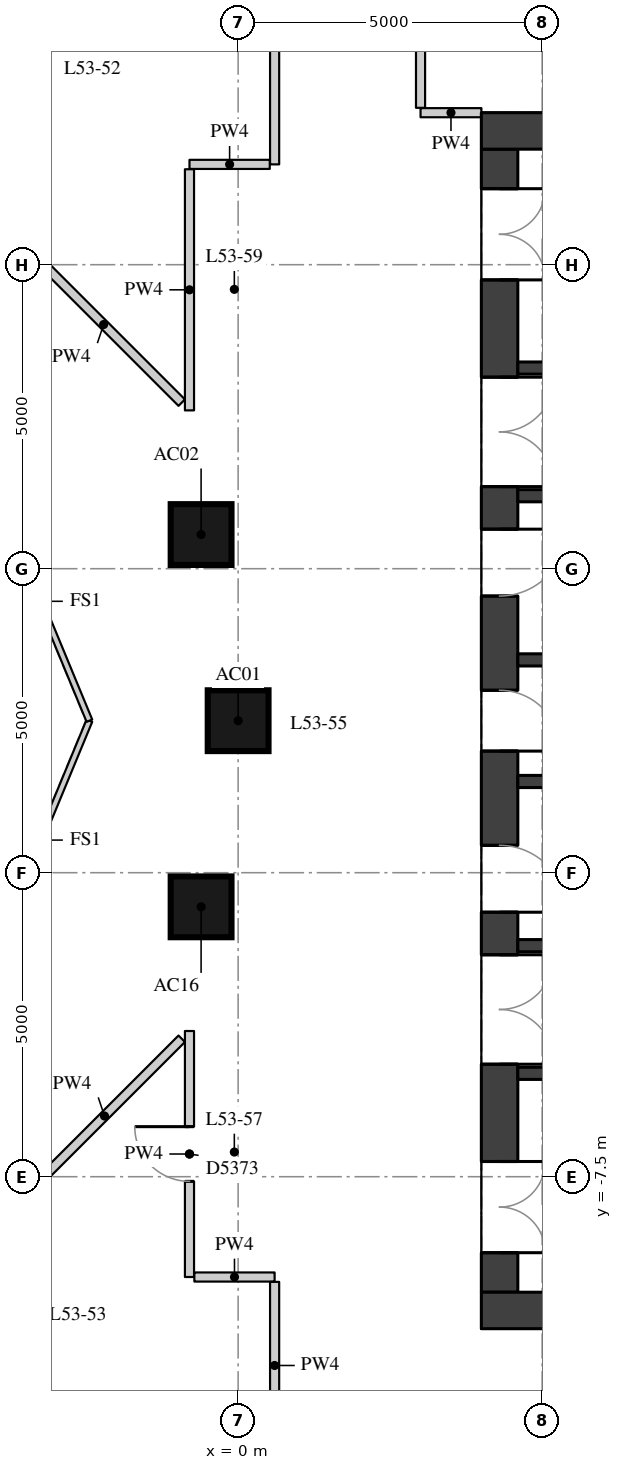
"""IFC4 building model, lengths in metres.
Left out: names, types, materials, properties, quantities, classifications, styles, units other than length and angle.
Written with IfcOpenShell. Run it as: python <this file> out.ifc"""

import sys

from ifc_helpers import new_model, si_unit, direction, frame, frame_2d, origin, origin_2d, place, context, subcontext, project, spatial, rectangle, extrude, element, fill, save


model = new_model("IFC4")
c1 = context("Model", 3, precision=1e-05, world=origin(), true_north=direction((0.0, 1.0)))
c2 = subcontext(c1, "Body", "Model", "MODEL_VIEW")
j1 = project(units=[si_unit("LENGTHUNIT", "METRE"), si_unit("PLANEANGLEUNIT", "RADIAN")], contexts=[c1])
p1 = place(None, origin())
s1 = spatial("IfcSite", under=j1, at=p1, CompositionType="ELEMENT")
p2 = place(p1, origin())
s2 = spatial("IfcBuilding", under=s1, at=p2, CompositionType="ELEMENT")
p3 = place(p2, frame((0.0, 0.0, 189.2)))
s3 = spatial("IfcBuildingStorey", under=s2, at=p3, CompositionType="ELEMENT", Elevation=189.2)
for number, where, z_axis, x_axis in (
    (1, (0.0, 0.0, 0.0), (0.0, 0.0, 1.0), (1.0, 0.0, 0.0)),
    (2, (-0.609, 3.062, 0.0), (0.0, 0.0, 1.0), (1.0, 0.0, 0.0)),
    (3, (-0.609, -3.062, 0.0), (0.0, 0.0, 1.0), (1.0, 0.0, 0.0)),
):
    element("IfcColumn", number, at=place(p3, frame(where, z_axis=z_axis, x_axis=x_axis)), inside=s3, PredefinedType="COLUMN", context=c2, shape_type="SweptSolid", body=[
        extrude(rectangle(XDim=1.0, YDim=1.0, at=origin_2d()), origin(), (0.0, 0.0, 1.0), 3.3),
    ])
p4 = place(p3, frame((4.3, -9.4, 0.0), z_axis=(0.0, 0.0, 1.0), x_axis=(0.0, 1.0, 0.0)))
e4 = element("IfcWall", 4, at=p4, inside=s3, PredefinedType="SHEAR", context=c2, shape_type="SweptSolid", body=[
    extrude(rectangle(XDim=18.8, YDim=0.6, at=frame_2d((9.4, 0.0))), origin(), (0.0, 0.0, 1.0), 3.02),
])
p5 = place(p4, frame((0.65, 0.0, 0.0)))
e5 = element("IfcOpeningElement", 5, at=p5, cuts=e4, PredefinedType="OPENING", context=c2, shape_type="SweptSolid", body=[
    extrude(rectangle(XDim=1.5, YDim=2.1, at=frame_2d((0.75, 1.05))), frame((0.0, 0.31, 0.0), z_axis=(0.0, -1.0, 0.0), x_axis=(1.0, 0.0, 0.0)), (0.0, 0.0, 1.0), 0.62),
])
p6 = place(p4, frame((3.75, 0.0, 0.0)))
e6 = element("IfcOpeningElement", 6, at=p6, cuts=e4, PredefinedType="OPENING", context=c2, shape_type="SweptSolid", body=[
    extrude(rectangle(XDim=1.8, YDim=2.1, at=frame_2d((0.9, 1.05))), frame((0.0, 0.31, 0.0), z_axis=(0.0, -1.0, 0.0), x_axis=(1.0, 0.0, 0.0)), (0.0, 0.0, 1.0), 0.62),
])
p7 = place(p4, frame((6.25, 0.0, 0.0)))
e7 = element("IfcOpeningElement", 7, at=p7, cuts=e4, PredefinedType="OPENING", context=c2, shape_type="SweptSolid", body=[
    extrude(rectangle(XDim=1.1, YDim=2.1, at=frame_2d((0.55, 1.05))), frame((0.0, 0.31, 0.0), z_axis=(0.0, -1.0, 0.0), x_axis=(1.0, 0.0, 0.0)), (0.0, 0.0, 1.0), 0.62),
])
p8 = place(p4, frame((8.9, 0.0, 0.0)))
e8 = element("IfcOpeningElement", 8, at=p8, cuts=e4, PredefinedType="OPENING", context=c2, shape_type="SweptSolid", body=[
    extrude(rectangle(XDim=1.0, YDim=2.1, at=frame_2d((0.5, 1.05))), frame((0.0, 0.31, 0.0), z_axis=(0.0, -1.0, 0.0), x_axis=(1.0, 0.0, 0.0)), (0.0, 0.0, 1.0), 0.62),
])
p9 = place(p4, frame((11.45, 0.0, 0.0)))
e9 = element("IfcOpeningElement", 9, at=p9, cuts=e4, PredefinedType="OPENING", context=c2, shape_type="SweptSolid", body=[
    extrude(rectangle(XDim=1.1, YDim=2.1, at=frame_2d((0.55, 1.05))), frame((0.0, 0.31, 0.0), z_axis=(0.0, -1.0, 0.0), x_axis=(1.0, 0.0, 0.0)), (0.0, 0.0, 1.0), 0.62),
])
p10 = place(p4, frame((13.25, 0.0, 0.0)))
e10 = element("IfcOpeningElement", 10, at=p10, cuts=e4, PredefinedType="OPENING", context=c2, shape_type="SweptSolid", body=[
    extrude(rectangle(XDim=1.8, YDim=2.1, at=frame_2d((0.9, 1.05))), frame((0.0, 0.31, 0.0), z_axis=(0.0, -1.0, 0.0), x_axis=(1.0, 0.0, 0.0)), (0.0, 0.0, 1.0), 0.62),
])
p11 = place(p4, frame((16.65, 0.0, 0.0)))
e11 = element("IfcOpeningElement", 11, at=p11, cuts=e4, PredefinedType="OPENING", context=c2, shape_type="SweptSolid", body=[
    extrude(rectangle(XDim=1.5, YDim=2.1, at=frame_2d((0.75, 1.05))), frame((0.0, 0.31, 0.0), z_axis=(0.0, -1.0, 0.0), x_axis=(1.0, 0.0, 0.0)), (0.0, 0.0, 1.0), 0.62),
])
for number, where, z_axis, x_axis in (
    (12, (4.0, 9.7, 0.0), (0.0, 0.0, 1.0), (1.0, 0.0, 0.0)),
    (13, (4.0, -9.7, 0.0), (0.0, 0.0, 1.0), (1.0, 0.0, 0.0)),
):
    element("IfcWall", number, at=place(p3, frame(where, z_axis=z_axis, x_axis=x_axis)), inside=s3, PredefinedType="SHEAR", context=c2, shape_type="SweptSolid", body=[
        extrude(rectangle(XDim=12.0, YDim=0.6, at=frame_2d((6.0, 0.0))), origin(), (0.0, 0.0, 1.0), 3.02),
    ])
p12 = place(p3, frame((4.6, 5.8, 0.0), z_axis=(0.0, 0.0, 1.0), x_axis=(1.0, 0.0, 0.0)))
e14 = element("IfcWall", 14, at=p12, inside=s3, PredefinedType="SHEAR", context=c2, shape_type="SweptSolid", body=[
    extrude(rectangle(XDim=10.8, YDim=0.2, at=frame_2d((5.4, 0.0))), origin(), (0.0, 0.0, 1.0), 3.02),
])
p13 = place(p12, frame((7.05, 0.0, 0.0)))
e15 = element("IfcOpeningElement", 15, at=p13, cuts=e14, PredefinedType="OPENING", context=c2, shape_type="SweptSolid", body=[
    extrude(rectangle(XDim=1.1, YDim=2.1, at=frame_2d((0.55, 1.05))), frame((0.0, 0.11, 0.0), z_axis=(0.0, -1.0, 0.0), x_axis=(1.0, 0.0, 0.0)), (0.0, 0.0, 1.0), 0.22),
])
p14 = place(p12, frame((9.05, 0.0, 0.0)))
e16 = element("IfcOpeningElement", 16, at=p14, cuts=e14, PredefinedType="OPENING", context=c2, shape_type="SweptSolid", body=[
    extrude(rectangle(XDim=1.1, YDim=2.1, at=frame_2d((0.55, 1.05))), frame((0.0, 0.11, 0.0), z_axis=(0.0, -1.0, 0.0), x_axis=(1.0, 0.0, 0.0)), (0.0, 0.0, 1.0), 0.22),
])
p15 = place(p3, frame((4.6, 3.7, 0.0), z_axis=(0.0, 0.0, 1.0), x_axis=(1.0, 0.0, 0.0)))
e17 = element("IfcWall", 17, at=p15, inside=s3, PredefinedType="SHEAR", context=c2, shape_type="SweptSolid", body=[
    extrude(rectangle(XDim=10.8, YDim=0.2, at=frame_2d((5.4, 0.0))), origin(), (0.0, 0.0, 1.0), 3.02),
])
p16 = place(p15, frame((6.6, 0.0, 0.0)))
e18 = element("IfcOpeningElement", 18, at=p16, cuts=e17, PredefinedType="OPENING", context=c2, shape_type="SweptSolid", body=[
    extrude(rectangle(XDim=1.1, YDim=2.1, at=frame_2d((0.55, 1.05))), frame((0.0, 0.11, 0.0), z_axis=(0.0, -1.0, 0.0), x_axis=(1.0, 0.0, 0.0)), (0.0, 0.0, 1.0), 0.22),
])
p17 = place(p15, frame((8.9, 0.0, 0.0)))
e19 = element("IfcOpeningElement", 19, at=p17, cuts=e17, PredefinedType="OPENING", context=c2, shape_type="SweptSolid", body=[
    extrude(rectangle(XDim=1.1, YDim=2.1, at=frame_2d((0.55, 1.05))), frame((0.0, 0.11, 0.0), z_axis=(0.0, -1.0, 0.0), x_axis=(1.0, 0.0, 0.0)), (0.0, 0.0, 1.0), 0.22),
])
for number, where, z_axis, x_axis in (
    (20, (4.6, 1.0, 0.0), (0.0, 0.0, 1.0), (1.0, 0.0, 0.0)),
    (21, (4.6, -1.0, 0.0), (0.0, 0.0, 1.0), (1.0, 0.0, 0.0)),
):
    element("IfcWall", number, at=place(p3, frame(where, z_axis=z_axis, x_axis=x_axis)), inside=s3, PredefinedType="SHEAR", context=c2, shape_type="SweptSolid", body=[
        extrude(rectangle(XDim=10.8, YDim=0.2, at=frame_2d((5.4, 0.0))), origin(), (0.0, 0.0, 1.0), 3.02),
    ])
p18 = place(p3, frame((4.6, -3.7, 0.0), z_axis=(0.0, 0.0, 1.0), x_axis=(1.0, 0.0, 0.0)))
e22 = element("IfcWall", 22, at=p18, inside=s3, PredefinedType="SHEAR", context=c2, shape_type="SweptSolid", body=[
    extrude(rectangle(XDim=10.8, YDim=0.2, at=frame_2d((5.4, 0.0))), origin(), (0.0, 0.0, 1.0), 3.02),
])
p19 = place(p18, frame((6.6, 0.0, 0.0)))
e23 = element("IfcOpeningElement", 23, at=p19, cuts=e22, PredefinedType="OPENING", context=c2, shape_type="SweptSolid", body=[
    extrude(rectangle(XDim=1.1, YDim=2.1, at=frame_2d((0.55, 1.05))), frame((0.0, 0.11, 0.0), z_axis=(0.0, -1.0, 0.0), x_axis=(1.0, 0.0, 0.0)), (0.0, 0.0, 1.0), 0.22),
])
p20 = place(p18, frame((8.9, 0.0, 0.0)))
e24 = element("IfcOpeningElement", 24, at=p20, cuts=e22, PredefinedType="OPENING", context=c2, shape_type="SweptSolid", body=[
    extrude(rectangle(XDim=1.1, YDim=2.1, at=frame_2d((0.55, 1.05))), frame((0.0, 0.11, 0.0), z_axis=(0.0, -1.0, 0.0), x_axis=(1.0, 0.0, 0.0)), (0.0, 0.0, 1.0), 0.22),
])
p21 = place(p3, frame((4.6, -5.8, 0.0), z_axis=(0.0, 0.0, 1.0), x_axis=(1.0, 0.0, 0.0)))
e25 = element("IfcWall", 25, at=p21, inside=s3, PredefinedType="SHEAR", context=c2, shape_type="SweptSolid", body=[
    extrude(rectangle(XDim=10.8, YDim=0.2, at=frame_2d((5.4, 0.0))), origin(), (0.0, 0.0, 1.0), 3.02),
])
p22 = place(p3, frame((4.001, 10.0, 0.0), z_axis=(0.0, 0.0, 1.0), x_axis=(-1.0, 0.0, 0.0)))
e26 = element("IfcWall", 26, at=p22, inside=s3, PredefinedType="PARTITIONING", context=c2, shape_type="SweptSolid", body=[
    extrude(rectangle(XDim=1.001, YDim=0.15, at=frame_2d((0.5, 0.0))), origin(), (0.0, 0.0, 1.0), 3.02),
])
p23 = place(p3, frame((3.0, 10.08, 0.0), z_axis=(0.0, 0.0, 1.0), x_axis=(0.0, 1.0, 0.0)))
e27 = element("IfcWall", 27, at=p23, inside=s3, PredefinedType="PARTITIONING", context=c2, shape_type="SweptSolid", body=[
    extrude(rectangle(XDim=2.742, YDim=0.15, at=frame_2d((1.371, 0.0))), origin(), (0.0, 0.0, 1.0), 3.02),
])
p24 = place(p3, frame((0.6, 13.7, 0.0), z_axis=(0.0, 0.0, 1.0), x_axis=(0.0, -1.0, 0.0)))
e28 = element("IfcWall", 28, at=p24, inside=s3, PredefinedType="PARTITIONING", context=c2, shape_type="SweptSolid", body=[
    extrude(rectangle(XDim=4.55, YDim=0.15, at=frame_2d((2.275, 0.0))), origin(), (0.0, 0.0, 1.0), 3.02),
])
p25 = place(p3, frame((0.52, 9.15, 0.0), z_axis=(0.0, 0.0, 1.0), x_axis=(-1.0, 0.0, 0.0)))
e29 = element("IfcWall", 29, at=p25, inside=s3, PredefinedType="PARTITIONING", context=c2, shape_type="SweptSolid", body=[
    extrude(rectangle(XDim=1.32, YDim=0.15, at=frame_2d((0.66, 0.0))), origin(), (0.0, 0.0, 1.0), 3.02),
])
p26 = place(p3, frame((-0.8, 9.07, 0.0), z_axis=(0.0, 0.0, 1.0), x_axis=(0.0, -1.0, 0.0)))
e30 = element("IfcWall", 30, at=p26, inside=s3, PredefinedType="PARTITIONING", context=c2, shape_type="SweptSolid", body=[
    extrude(rectangle(XDim=3.966, YDim=0.15, at=frame_2d((1.983, 0.0))), origin(), (0.0, 0.0, 1.0), 3.02),
])
p27 = place(p3, frame((-0.927, 5.231, 0.0), z_axis=(0.0, 0.0, 1.0), x_axis=(-0.707106781187, 0.707106781187, 0.0)))
e31 = element("IfcWall", 31, at=p27, inside=s3, PredefinedType="PARTITIONING", context=c2, shape_type="SweptSolid", body=[
    extrude(rectangle(XDim=3.633, YDim=0.15, at=frame_2d((1.817, 0.0))), origin(), (0.0, 0.0, 1.0), 3.02),
])
p28 = place(p3, frame((-0.8, -5.104, 0.0), z_axis=(0.0, 0.0, 1.0), x_axis=(0.0, -1.0, 0.0)))
e32 = element("IfcWall", 32, at=p28, inside=s3, PredefinedType="PARTITIONING", context=c2, shape_type="SweptSolid", body=[
    extrude(rectangle(XDim=4.046, YDim=0.15, at=frame_2d((2.023, 0.0))), origin(), (0.0, 0.0, 1.0), 3.02),
])
p29 = place(p28, frame((1.573, 0.0, 0.0)))
e33 = element("IfcOpeningElement", 33, at=p29, cuts=e32, PredefinedType="OPENING", context=c2, shape_type="SweptSolid", body=[
    extrude(rectangle(XDim=0.9, YDim=2.1, at=frame_2d((0.45, 1.05))), frame((0.0, 0.085, 0.0), z_axis=(0.0, -1.0, 0.0), x_axis=(1.0, 0.0, 0.0)), (0.0, 0.0, 1.0), 0.17),
])
p30 = place(p3, frame((-0.72, -9.15, 0.0), z_axis=(0.0, 0.0, 1.0), x_axis=(1.0, 0.0, 0.0)))
e34 = element("IfcWall", 34, at=p30, inside=s3, PredefinedType="PARTITIONING", context=c2, shape_type="SweptSolid", body=[
    extrude(rectangle(XDim=1.32, YDim=0.15, at=frame_2d((0.66, 0.0))), origin(), (0.0, 0.0, 1.0), 3.02),
])
p31 = place(p3, frame((0.6, -9.23, 0.0), z_axis=(0.0, 0.0, 1.0), x_axis=(0.0, -1.0, 0.0)))
e35 = element("IfcWall", 35, at=p31, inside=s3, PredefinedType="PARTITIONING", context=c2, shape_type="SweptSolid", body=[
    extrude(rectangle(XDim=2.75, YDim=0.15, at=frame_2d((1.375, 0.0))), origin(), (0.0, 0.0, 1.0), 3.02),
])
p32 = place(p3, frame((-3.468, -7.772, 0.0), z_axis=(0.0, 0.0, 1.0), x_axis=(0.707106781187, 0.707106781187, 0.0)))
e36 = element("IfcWall", 36, at=p32, inside=s3, PredefinedType="PARTITIONING", context=c2, shape_type="SweptSolid", body=[
    extrude(rectangle(XDim=3.593, YDim=0.15, at=frame_2d((1.797, 0.0))), origin(), (0.0, 0.0, 1.0), 3.02),
])
for number, where, z_axis, x_axis in (
    (37, (-2.446, 0.0, 0.0), (0.0, 0.0, 1.0), (-0.383, -0.924, 0.0)),
    (38, (-4.073, 3.927, 0.0), (0.0, 0.0, 1.0), (0.383, -0.924, 0.0)),
):
    element("IfcWall", number, at=place(p3, frame(where, z_axis=z_axis, x_axis=x_axis)), inside=s3, PredefinedType="PARTITIONING", context=c2, shape_type="SweptSolid", body=[
        extrude(rectangle(XDim=4.251, YDim=0.1, at=frame_2d((2.125, 0.0))), origin(), (0.0, 0.0, 1.0), 3.02),
    ])
p33 = place(p5, origin())
e39 = element("IfcDoor", 39, at=p33, inside=s3, OperationType="DOUBLE_DOOR_SINGLE_SWING", PredefinedType="DOOR", context=c2, shape_type="SweptSolid", body=[
    extrude(rectangle(XDim=1.5, YDim=2.1, at=frame_2d((0.75, 1.05))), frame((0.0, 0.025, 0.0), z_axis=(0.0, -1.0, 0.0), x_axis=(1.0, 0.0, 0.0)), (0.0, 0.0, 1.0), 0.05),
])
fill(e5, e39)
p34 = place(p6, origin())
e40 = element("IfcDoor", 40, at=p34, inside=s3, OperationType="DOUBLE_DOOR_SINGLE_SWING", PredefinedType="DOOR", context=c2, shape_type="SweptSolid", body=[
    extrude(rectangle(XDim=1.8, YDim=2.1, at=frame_2d((0.9, 1.05))), frame((0.0, 0.025, 0.0), z_axis=(0.0, -1.0, 0.0), x_axis=(1.0, 0.0, 0.0)), (0.0, 0.0, 1.0), 0.05),
])
fill(e6, e40)
p35 = place(p7, origin())
e41 = element("IfcDoor", 41, at=p35, inside=s3, OperationType="SINGLE_SWING_RIGHT", PredefinedType="DOOR", context=c2, shape_type="SweptSolid", body=[
    extrude(rectangle(XDim=1.1, YDim=2.1, at=frame_2d((0.55, 1.05))), frame((0.0, 0.025, 0.0), z_axis=(0.0, -1.0, 0.0), x_axis=(1.0, 0.0, 0.0)), (0.0, 0.0, 1.0), 0.05),
])
fill(e7, e41)
p36 = place(p8, origin())
e42 = element("IfcDoor", 42, at=p36, inside=s3, OperationType="SINGLE_SWING_RIGHT", PredefinedType="DOOR", context=c2, shape_type="SweptSolid", body=[
    extrude(rectangle(XDim=1.0, YDim=2.1, at=frame_2d((0.5, 1.05))), frame((0.0, 0.025, 0.0), z_axis=(0.0, -1.0, 0.0), x_axis=(1.0, 0.0, 0.0)), (0.0, 0.0, 1.0), 0.05),
])
fill(e8, e42)
p37 = place(p9, origin())
e43 = element("IfcDoor", 43, at=p37, inside=s3, OperationType="SINGLE_SWING_LEFT", PredefinedType="DOOR", context=c2, shape_type="SweptSolid", body=[
    extrude(rectangle(XDim=1.1, YDim=2.1, at=frame_2d((0.55, 1.05))), frame((0.0, 0.025, 0.0), z_axis=(0.0, -1.0, 0.0), x_axis=(1.0, 0.0, 0.0)), (0.0, 0.0, 1.0), 0.05),
])
fill(e9, e43)
p38 = place(p10, origin())
e44 = element("IfcDoor", 44, at=p38, inside=s3, OperationType="DOUBLE_DOOR_SINGLE_SWING", PredefinedType="DOOR", context=c2, shape_type="SweptSolid", body=[
    extrude(rectangle(XDim=1.8, YDim=2.1, at=frame_2d((0.9, 1.05))), frame((0.0, 0.025, 0.0), z_axis=(0.0, -1.0, 0.0), x_axis=(1.0, 0.0, 0.0)), (0.0, 0.0, 1.0), 0.05),
])
fill(e10, e44)
p39 = place(p11, origin())
e45 = element("IfcDoor", 45, at=p39, inside=s3, OperationType="DOUBLE_DOOR_SINGLE_SWING", PredefinedType="DOOR", context=c2, shape_type="SweptSolid", body=[
    extrude(rectangle(XDim=1.5, YDim=2.1, at=frame_2d((0.75, 1.05))), frame((0.0, 0.025, 0.0), z_axis=(0.0, -1.0, 0.0), x_axis=(1.0, 0.0, 0.0)), (0.0, 0.0, 1.0), 0.05),
])
fill(e11, e45)
p40 = place(p29, origin())
e46 = element("IfcDoor", 46, at=p40, inside=s3, OperationType="SINGLE_SWING_RIGHT", PredefinedType="DOOR", context=c2, shape_type="SweptSolid", body=[
    extrude(rectangle(XDim=0.9, YDim=2.1, at=frame_2d((0.45, 1.05))), frame((0.0, 0.025, 0.0), z_axis=(0.0, -1.0, 0.0), x_axis=(1.0, 0.0, 0.0)), (0.0, 0.0, 1.0), 0.05),
])
fill(e33, e46)
save(model, sys.argv[1])
